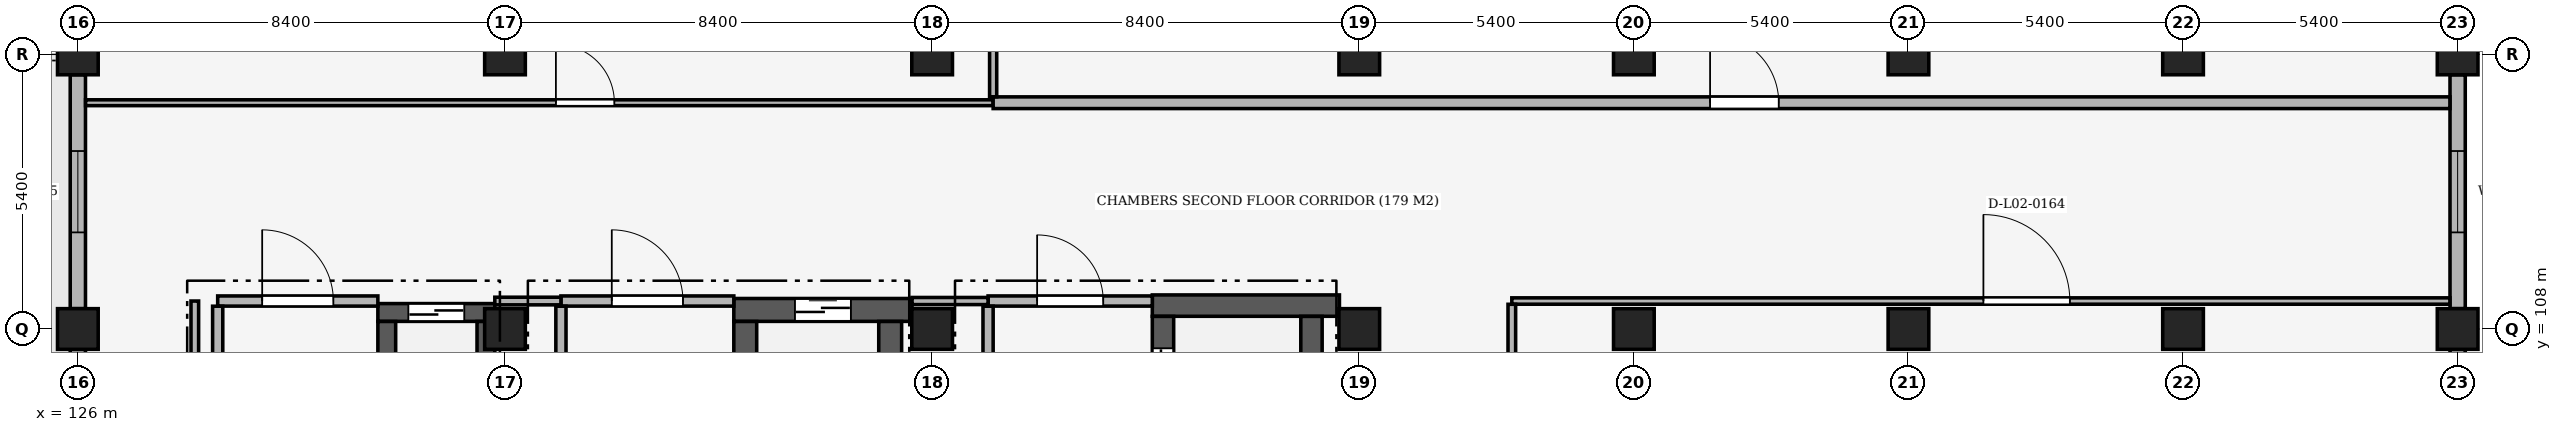
"""IFC4 building model, lengths in metres.
Left out: names, types, materials, properties, quantities, classifications, styles, units other than length and angle.
Written with IfcOpenShell. Run it as: python <this file> out.ifc"""

import sys

from ifc_helpers import new_model, si_unit, direction, frame, frame_2d, origin, origin_2d, place, context, subcontext, project, spatial, rectangle, extrude, element, fill, save


model = new_model("IFC4")
c1 = context("Model", 3, precision=1e-05, world=origin(), true_north=direction((0.0, 1.0)))
c2 = subcontext(c1, "Body", "Model", "MODEL_VIEW")
j1 = project(units=[si_unit("LENGTHUNIT", "METRE"), si_unit("PLANEANGLEUNIT", "RADIAN")], contexts=[c1])
p1 = place(None, origin())
s1 = spatial("IfcSite", under=j1, at=p1, CompositionType="ELEMENT")
p2 = place(p1, origin())
s2 = spatial("IfcBuilding", under=s1, at=p2, CompositionType="ELEMENT")
p3 = place(p2, frame((0.0, 0.0, 10.2)))
s3 = spatial("IfcBuildingStorey", under=s2, at=p3, CompositionType="ELEMENT", Elevation=10.2)
for number, where, z_axis, x_axis in (
    (1, (126.0, 108.0, 0.0), (0.0, 0.0, 1.0), (1.0, 0.0, 0.0)),
    (2, (126.0, 113.4, 0.0), (0.0, 0.0, 1.0), (1.0, 0.0, 0.0)),
    (3, (134.4, 108.0, 0.0), (0.0, 0.0, 1.0), (1.0, 0.0, 0.0)),
    (4, (134.4, 113.4, 0.0), (0.0, 0.0, 1.0), (1.0, 0.0, 0.0)),
    (5, (142.8, 108.0, 0.0), (0.0, 0.0, 1.0), (1.0, 0.0, 0.0)),
    (6, (142.8, 113.4, 0.0), (0.0, 0.0, 1.0), (1.0, 0.0, 0.0)),
    (7, (151.2, 108.0, 0.0), (0.0, 0.0, 1.0), (1.0, 0.0, 0.0)),
    (8, (151.2, 113.4, 0.0), (0.0, 0.0, 1.0), (1.0, 0.0, 0.0)),
    (9, (156.6, 108.0, 0.0), (0.0, 0.0, 1.0), (1.0, 0.0, 0.0)),
    (10, (156.6, 113.4, 0.0), (0.0, 0.0, 1.0), (1.0, 0.0, 0.0)),
    (11, (162.0, 108.0, 0.0), (0.0, 0.0, 1.0), (1.0, 0.0, 0.0)),
    (12, (162.0, 113.4, 0.0), (0.0, 0.0, 1.0), (1.0, 0.0, 0.0)),
    (13, (167.4, 108.0, 0.0), (0.0, 0.0, 1.0), (1.0, 0.0, 0.0)),
    (14, (167.4, 113.4, 0.0), (0.0, 0.0, 1.0), (1.0, 0.0, 0.0)),
    (15, (172.8, 108.0, 0.0), (0.0, 0.0, 1.0), (1.0, 0.0, 0.0)),
    (16, (172.8, 113.4, 0.0), (0.0, 0.0, 1.0), (1.0, 0.0, 0.0)),
):
    element("IfcColumn", number, at=place(p3, frame(where, z_axis=z_axis, x_axis=x_axis)), inside=s3, PredefinedType="COLUMN", context=c2, shape_type="SweptSolid", body=[
        extrude(rectangle(XDim=0.8, YDim=0.8, at=origin_2d()), origin(), (0.0, 0.0, 1.0), 5.1),
    ])
p4 = place(p3, frame((172.8, 113.0, 0.0), z_axis=(0.0, 0.0, 1.0), x_axis=(0.0, -1.0, 0.0)))
e17 = element("IfcWall", 17, at=p4, inside=s3, PredefinedType="SOLIDWALL", context=c2, shape_type="SweptSolid", body=[
    extrude(rectangle(XDim=4.6, YDim=0.3, at=frame_2d((2.3, 0.0))), origin(), (0.0, 0.0, 1.0), 4.27),
])
p5 = place(p4, frame((1.5, 0.0, 1.05)))
e18 = element("IfcOpeningElement", 18, at=p5, cuts=e17, PredefinedType="OPENING", context=c2, shape_type="SweptSolid", body=[
    extrude(rectangle(XDim=1.6, YDim=1.8, at=frame_2d((0.8, 0.9))), frame((0.0, 0.165, 0.0), z_axis=(0.0, -1.0, 0.0), x_axis=(1.0, 0.0, 0.0)), (0.0, 0.0, 1.0), 0.33),
])
p6 = place(p3, frame((172.8, 107.6, 0.0), z_axis=(0.0, 0.0, 1.0), x_axis=(0.0, -1.0, 0.0)))
e19 = element("IfcWall", 19, at=p6, inside=s3, PredefinedType="SOLIDWALL", context=c2, shape_type="SweptSolid", body=[
    extrude(rectangle(XDim=7.6, YDim=0.3, at=frame_2d((3.8, 0.0))), origin(), (0.0, 0.0, 1.0), 4.12),
])
p7 = place(p6, frame((1.467, 0.0, 1.05)))
e20 = element("IfcOpeningElement", 20, at=p7, cuts=e19, PredefinedType="OPENING", context=c2, shape_type="SweptSolid", body=[
    extrude(rectangle(XDim=1.6, YDim=1.8, at=frame_2d((0.8, 0.9))), frame((0.0, 0.165, 0.0), z_axis=(0.0, -1.0, 0.0), x_axis=(1.0, 0.0, 0.0)), (0.0, 0.0, 1.0), 0.33),
])
p8 = place(p6, frame((4.533, 0.0, 1.05)))
e21 = element("IfcOpeningElement", 21, at=p8, cuts=e19, PredefinedType="OPENING", context=c2, shape_type="SweptSolid", body=[
    extrude(rectangle(XDim=1.6, YDim=1.8, at=frame_2d((0.8, 0.9))), frame((0.0, 0.165, 0.0), z_axis=(0.0, -1.0, 0.0), x_axis=(1.0, 0.0, 0.0)), (0.0, 0.0, 1.0), 0.33),
])
p9 = place(p3, frame((126.0, 100.0, 0.0), z_axis=(0.0, 0.0, 1.0), x_axis=(0.0, 1.0, 0.0)))
e22 = element("IfcWall", 22, at=p9, inside=s3, PredefinedType="SOLIDWALL", context=c2, shape_type="SweptSolid", body=[
    extrude(rectangle(XDim=7.6, YDim=0.3, at=frame_2d((3.8, 0.0))), origin(), (0.0, 0.0, 1.0), 4.12),
])
p10 = place(p9, frame((2.9, 0.0, 0.0)))
e23 = element("IfcOpeningElement", 23, at=p10, cuts=e22, PredefinedType="OPENING", context=c2, shape_type="SweptSolid", body=[
    extrude(rectangle(XDim=1.8, YDim=2.2, at=frame_2d((0.9, 1.1))), frame((0.0, 0.165, 0.0), z_axis=(0.0, -1.0, 0.0), x_axis=(1.0, 0.0, 0.0)), (0.0, 0.0, 1.0), 0.33),
])
p11 = place(p3, frame((126.0, 108.4, 0.0), z_axis=(0.0, 0.0, 1.0), x_axis=(0.0, 1.0, 0.0)))
e24 = element("IfcWall", 24, at=p11, inside=s3, PredefinedType="SOLIDWALL", context=c2, shape_type="SweptSolid", body=[
    extrude(rectangle(XDim=4.6, YDim=0.3, at=frame_2d((2.3, 0.0))), origin(), (0.0, 0.0, 1.0), 4.27),
])
p12 = place(p11, frame((1.5, 0.0, 1.05)))
e25 = element("IfcOpeningElement", 25, at=p12, cuts=e24, PredefinedType="OPENING", context=c2, shape_type="SweptSolid", body=[
    extrude(rectangle(XDim=1.6, YDim=1.8, at=frame_2d((0.8, 0.9))), frame((0.0, 0.165, 0.0), z_axis=(0.0, -1.0, 0.0), x_axis=(1.0, 0.0, 0.0)), (0.0, 0.0, 1.0), 0.33),
])
p13 = place(p3, frame((131.9, 108.325, 0.0), z_axis=(0.0, 0.0, 1.0), x_axis=(1.0, 0.0, 0.0)))
e26 = element("IfcWall", 26, at=p13, inside=s3, PredefinedType="SHEAR", context=c2, shape_type="SweptSolid", body=[
    extrude(rectangle(XDim=2.3, YDim=0.35, at=frame_2d((1.15, 0.0))), origin(), (0.0, 0.0, 1.0), 4.82),
])
p14 = place(p13, frame((0.6, 0.0, 0.0)))
e27 = element("IfcOpeningElement", 27, at=p14, cuts=e26, PredefinedType="OPENING", context=c2, shape_type="SweptSolid", body=[
    extrude(rectangle(XDim=1.1, YDim=2.15, at=frame_2d((0.55, 1.075))), frame((0.0, 0.19, 0.0), z_axis=(0.0, -1.0, 0.0), x_axis=(1.0, 0.0, 0.0)), (0.0, 0.0, 1.0), 0.38),
])
for number, where, z_axis, x_axis in (
    (28, (132.075, 106.093, 0.0), (0.0, 0.0, 1.0), (0.0, 1.0, 0.0)),
    (29, (134.025, 106.093, 0.0), (0.0, 0.0, 1.0), (0.0, 1.0, 0.0)),
):
    element("IfcWall", number, at=place(p3, frame(where, z_axis=z_axis, x_axis=x_axis)), inside=s3, PredefinedType="SHEAR", context=c2, shape_type="SweptSolid", body=[
        extrude(rectangle(XDim=2.055, YDim=0.35, at=frame_2d((1.027, 0.0))), origin(), (0.0, 0.0, 1.0), 4.82),
    ])
p15 = place(p3, frame((138.9, 108.375, 0.0), z_axis=(0.0, 0.0, 1.0), x_axis=(1.0, 0.0, 0.0)))
e30 = element("IfcWall", 30, at=p15, inside=s3, PredefinedType="SHEAR", context=c2, shape_type="SweptSolid", body=[
    extrude(rectangle(XDim=3.505, YDim=0.45, at=frame_2d((1.752, 0.0))), origin(), (0.0, 0.0, 1.0), 4.82),
])
p16 = place(p15, frame((1.202, 0.0, 0.0)))
e31 = element("IfcOpeningElement", 31, at=p16, cuts=e30, PredefinedType="OPENING", context=c2, shape_type="SweptSolid", body=[
    extrude(rectangle(XDim=1.1, YDim=2.15, at=frame_2d((0.55, 1.075))), frame((0.0, 0.24, 0.0), z_axis=(0.0, -1.0, 0.0), x_axis=(1.0, 0.0, 0.0)), (0.0, 0.0, 1.0), 0.48),
])
for number, where, z_axis, x_axis in (
    (32, (139.125, 106.093, 0.0), (0.0, 0.0, 1.0), (0.0, 1.0, 0.0)),
    (33, (141.975, 106.093, 0.0), (0.0, 0.0, 1.0), (0.0, 1.0, 0.0)),
):
    element("IfcWall", number, at=place(p3, frame(where, z_axis=z_axis, x_axis=x_axis)), inside=s3, PredefinedType="SHEAR", context=c2, shape_type="SweptSolid", body=[
        extrude(rectangle(XDim=2.055, YDim=0.45, at=frame_2d((1.027, 0.0))), origin(), (0.0, 0.0, 1.0), 4.82),
    ])
p17 = place(p3, frame((147.13, 108.46, 0.0), z_axis=(0.0, 0.0, 1.0), x_axis=(1.0, 0.0, 0.0)))
e34 = element("IfcWall", 34, at=p17, inside=s3, PredefinedType="SHEAR", context=c2, shape_type="SweptSolid", body=[
    extrude(rectangle(XDim=3.68, YDim=0.42, at=frame_2d((1.84, 0.0))), origin(), (0.0, 0.0, 1.0), 4.82),
])
p18 = place(p3, frame((147.34, 105.793, 0.0), z_axis=(0.0, 0.0, 1.0), x_axis=(0.0, 1.0, 0.0)))
e35 = element("IfcWall", 35, at=p18, inside=s3, PredefinedType="SHEAR", context=c2, shape_type="SweptSolid", body=[
    extrude(rectangle(XDim=2.455, YDim=0.42, at=frame_2d((1.228, 0.0))), origin(), (0.0, 0.0, 1.0), 4.82),
])
p19 = place(p18, frame((0.627, 0.0, 0.0)))
e36 = element("IfcOpeningElement", 36, at=p19, cuts=e35, PredefinedType="OPENING", context=c2, shape_type="SweptSolid", body=[
    extrude(rectangle(XDim=1.2, YDim=2.15, at=frame_2d((0.6, 1.075))), frame((0.0, 0.225, 0.0), z_axis=(0.0, -1.0, 0.0), x_axis=(1.0, 0.0, 0.0)), (0.0, 0.0, 1.0), 0.45),
])
p20 = place(p3, frame((150.26, 105.793, 0.0), z_axis=(0.0, 0.0, 1.0), x_axis=(0.0, 1.0, 0.0)))
e37 = element("IfcWall", 37, at=p20, inside=s3, PredefinedType="SHEAR", context=c2, shape_type="SweptSolid", body=[
    extrude(rectangle(XDim=2.455, YDim=0.42, at=frame_2d((1.228, 0.0))), origin(), (0.0, 0.0, 1.0), 4.82),
])
p21 = place(p3, frame((128.75, 108.55, 0.0), z_axis=(0.0, 0.0, 1.0), x_axis=(1.0, 0.0, 0.0)))
e38 = element("IfcWall", 38, at=p21, inside=s3, PredefinedType="PARTITIONING", context=c2, shape_type="SweptSolid", body=[
    extrude(rectangle(XDim=3.15, YDim=0.2, at=frame_2d((1.575, 0.0))), origin(), (0.0, 0.0, 1.0), 4.82),
])
p22 = place(p21, frame((0.875, 0.0, 0.0)))
e39 = element("IfcOpeningElement", 39, at=p22, cuts=e38, PredefinedType="OPENING", context=c2, shape_type="SweptSolid", body=[
    extrude(rectangle(XDim=1.4, YDim=2.2, at=frame_2d((0.7, 1.1))), frame((0.0, 0.115, 0.0), z_axis=(0.0, -1.0, 0.0), x_axis=(1.0, 0.0, 0.0)), (0.0, 0.0, 1.0), 0.23),
])
p23 = place(p3, frame((135.5, 108.55, 0.0), z_axis=(0.0, 0.0, 1.0), x_axis=(1.0, 0.0, 0.0)))
e40 = element("IfcWall", 40, at=p23, inside=s3, PredefinedType="PARTITIONING", context=c2, shape_type="SweptSolid", body=[
    extrude(rectangle(XDim=3.4, YDim=0.2, at=frame_2d((1.7, 0.0))), origin(), (0.0, 0.0, 1.0), 4.82),
])
p24 = place(p23, frame((1.0, 0.0, 0.0)))
e41 = element("IfcOpeningElement", 41, at=p24, cuts=e40, PredefinedType="OPENING", context=c2, shape_type="SweptSolid", body=[
    extrude(rectangle(XDim=1.4, YDim=2.2, at=frame_2d((0.7, 1.1))), frame((0.0, 0.115, 0.0), z_axis=(0.0, -1.0, 0.0), x_axis=(1.0, 0.0, 0.0)), (0.0, 0.0, 1.0), 0.23),
])
p25 = place(p3, frame((143.9, 108.55, 0.0), z_axis=(0.0, 0.0, 1.0), x_axis=(1.0, 0.0, 0.0)))
e42 = element("IfcWall", 42, at=p25, inside=s3, PredefinedType="PARTITIONING", context=c2, shape_type="SweptSolid", body=[
    extrude(rectangle(XDim=3.23, YDim=0.2, at=frame_2d((1.615, 0.0))), origin(), (0.0, 0.0, 1.0), 4.82),
])
p26 = place(p25, frame((0.965, 0.0, 0.0)))
e43 = element("IfcOpeningElement", 43, at=p26, cuts=e42, PredefinedType="OPENING", context=c2, shape_type="SweptSolid", body=[
    extrude(rectangle(XDim=1.3, YDim=2.2, at=frame_2d((0.65, 1.1))), frame((0.0, 0.115, 0.0), z_axis=(0.0, -1.0, 0.0), x_axis=(1.0, 0.0, 0.0)), (0.0, 0.0, 1.0), 0.23),
])
p27 = place(p3, frame((134.2, 108.55, 0.0), z_axis=(0.0, 0.0, 1.0), x_axis=(1.0, 0.0, 0.0)))
e44 = element("IfcWall", 44, at=p27, inside=s3, PredefinedType="PARTITIONING", context=c2, shape_type="SweptSolid", body=[
    extrude(rectangle(XDim=1.3, YDim=0.15, at=frame_2d((0.65, 0.0))), origin(), (0.0, 0.0, 1.0), 4.27),
])
p28 = place(p3, frame((142.405, 108.55, 0.0), z_axis=(0.0, 0.0, 1.0), x_axis=(1.0, 0.0, 0.0)))
e45 = element("IfcWall", 45, at=p28, inside=s3, PredefinedType="PARTITIONING", context=c2, shape_type="SweptSolid", body=[
    extrude(rectangle(XDim=1.495, YDim=0.14, at=frame_2d((0.748, 0.0))), origin(), (0.0, 0.0, 1.0), 4.27),
])
p29 = place(p3, frame((154.2, 108.55, 0.0), z_axis=(0.0, 0.0, 1.0), x_axis=(1.0, 0.0, 0.0)))
e46 = element("IfcWall", 46, at=p29, inside=s3, PredefinedType="PARTITIONING", context=c2, shape_type="SweptSolid", body=[
    extrude(rectangle(XDim=18.448, YDim=0.125, at=frame_2d((9.224, 0.0))), origin(), (0.0, 0.0, 1.0), 4.27),
])
p30 = place(p29, frame((9.274, 0.0, 0.0)))
e47 = element("IfcOpeningElement", 47, at=p30, cuts=e46, PredefinedType="OPENING", context=c2, shape_type="SweptSolid", body=[
    extrude(rectangle(XDim=1.7, YDim=2.35, at=frame_2d((0.85, 1.175))), frame((0.0, 0.077, 0.0), z_axis=(0.0, -1.0, 0.0), x_axis=(1.0, 0.0, 0.0)), (0.0, 0.0, 1.0), 0.155),
])
p31 = place(p3, frame((126.152, 112.45, 0.0), z_axis=(0.0, 0.0, 1.0), x_axis=(1.0, 0.0, 0.0)))
e48 = element("IfcWall", 48, at=p31, inside=s3, PredefinedType="PARTITIONING", context=c2, shape_type="SweptSolid", body=[
    extrude(rectangle(XDim=17.848, YDim=0.115, at=frame_2d((8.924, 0.0))), origin(), (0.0, 0.0, 1.0), 4.27),
])
p32 = place(p31, frame((9.249, 0.0, 0.0)))
e49 = element("IfcOpeningElement", 49, at=p32, cuts=e48, PredefinedType="OPENING", context=c2, shape_type="SweptSolid", body=[
    extrude(rectangle(XDim=1.15, YDim=2.15, at=frame_2d((0.575, 1.075))), frame((0.0, 0.072, 0.0), z_axis=(0.0, -1.0, 0.0), x_axis=(1.0, 0.0, 0.0)), (0.0, 0.0, 1.0), 0.145),
])
p33 = place(p3, frame((144.0, 112.45, 0.0), z_axis=(0.0, 0.0, 1.0), x_axis=(1.0, 0.0, 0.0)))
e50 = element("IfcWall", 50, at=p33, inside=s3, PredefinedType="SOLIDWALL", context=c2, shape_type="SweptSolid", body=[
    extrude(rectangle(XDim=28.648, YDim=0.23, at=frame_2d((14.324, 0.0))), origin(), (0.0, 0.0, 1.0), 4.27),
])
p34 = place(p33, frame((14.099, 0.0, 0.0)))
e51 = element("IfcOpeningElement", 51, at=p34, cuts=e50, PredefinedType="OPENING", context=c2, shape_type="SweptSolid", body=[
    extrude(rectangle(XDim=1.35, YDim=2.2, at=frame_2d((0.675, 1.1))), frame((0.0, 0.13, 0.0), z_axis=(0.0, -1.0, 0.0), x_axis=(1.0, 0.0, 0.0)), (0.0, 0.0, 1.0), 0.26),
])
p35 = place(p3, frame((128.3, 103.248, 0.0), z_axis=(0.0, 0.0, 1.0), x_axis=(0.0, 1.0, 0.0)))
e52 = element("IfcWall", 52, at=p35, inside=s3, PredefinedType="PARTITIONING", context=c2, shape_type="SweptSolid", body=[
    extrude(rectangle(XDim=5.302, YDim=0.15, at=frame_2d((2.651, 0.0))), origin(), (0.0, 0.0, 1.0), 4.82),
])
p36 = place(p3, frame((128.75, 103.602, 0.0), z_axis=(0.0, 0.0, 1.0), x_axis=(0.0, 1.0, 0.0)))
e53 = element("IfcWall", 53, at=p36, inside=s3, PredefinedType="PARTITIONING", context=c2, shape_type="SweptSolid", body=[
    extrude(rectangle(XDim=4.846, YDim=0.2, at=frame_2d((2.423, 0.0))), origin(), (0.0, 0.0, 1.0), 4.82),
])
p37 = place(p3, frame((135.5, 103.702, 0.0), z_axis=(0.0, 0.0, 1.0), x_axis=(0.0, 1.0, 0.0)))
e54 = element("IfcWall", 54, at=p37, inside=s3, PredefinedType="PARTITIONING", context=c2, shape_type="SweptSolid", body=[
    extrude(rectangle(XDim=4.746, YDim=0.2, at=frame_2d((2.373, 0.0))), origin(), (0.0, 0.0, 1.0), 4.82),
])
p38 = place(p3, frame((143.9, 103.672, 0.0), z_axis=(0.0, 0.0, 1.0), x_axis=(0.0, 1.0, 0.0)))
e55 = element("IfcWall", 55, at=p38, inside=s3, PredefinedType="PARTITIONING", context=c2, shape_type="SweptSolid", body=[
    extrude(rectangle(XDim=4.776, YDim=0.2, at=frame_2d((2.388, 0.0))), origin(), (0.0, 0.0, 1.0), 4.82),
])
p39 = place(p3, frame((144.0, 112.567, 0.0), z_axis=(0.0, 0.0, 1.0), x_axis=(0.0, 1.0, 0.0)))
e56 = element("IfcWall", 56, at=p39, inside=s3, PredefinedType="PARTITIONING", context=c2, shape_type="SweptSolid", body=[
    extrude(rectangle(XDim=6.081, YDim=0.14, at=frame_2d((3.041, 0.0))), origin(), (0.0, 0.0, 1.0), 4.12),
])
p40 = place(p3, frame((154.2, 93.752, 0.0), z_axis=(0.0, 0.0, 1.0), x_axis=(0.0, 1.0, 0.0)))
e57 = element("IfcWall", 57, at=p40, inside=s3, PredefinedType="PARTITIONING", context=c2, shape_type="SweptSolid", body=[
    extrude(rectangle(XDim=14.734, YDim=0.15, at=frame_2d((7.367, 0.0))), origin(), (0.0, 0.0, 1.0), 4.22),
])
p41 = place(p5, origin())
e58 = element("IfcWindow", 58, at=p41, inside=s3, PartitioningType="SINGLE_PANEL", PredefinedType="WINDOW", context=c2, shape_type="SweptSolid", body=[
    extrude(rectangle(XDim=1.6, YDim=1.8, at=frame_2d((0.8, 0.9))), frame((0.0, 0.03, 0.0), z_axis=(0.0, -1.0, 0.0), x_axis=(1.0, 0.0, 0.0)), (0.0, 0.0, 1.0), 0.06),
])
fill(e18, e58)
p42 = place(p12, origin())
e59 = element("IfcWindow", 59, at=p42, inside=s3, PartitioningType="SINGLE_PANEL", PredefinedType="WINDOW", context=c2, shape_type="SweptSolid", body=[
    extrude(rectangle(XDim=1.6, YDim=1.8, at=frame_2d((0.8, 0.9))), frame((0.0, 0.03, 0.0), z_axis=(0.0, -1.0, 0.0), x_axis=(1.0, 0.0, 0.0)), (0.0, 0.0, 1.0), 0.06),
])
fill(e25, e59)
p43 = place(p14, origin())
e60 = element("IfcDoor", 60, at=p43, inside=s3, OperationType="DOUBLE_DOOR_SLIDING", PredefinedType="DOOR", context=c2, shape_type="SweptSolid", body=[
    extrude(rectangle(XDim=1.1, YDim=2.15, at=frame_2d((0.55, 1.075))), frame((0.0, 0.025, 0.0), z_axis=(0.0, -1.0, 0.0), x_axis=(1.0, 0.0, 0.0)), (0.0, 0.0, 1.0), 0.05),
])
fill(e27, e60)
p44 = place(p16, origin())
e61 = element("IfcDoor", 61, at=p44, inside=s3, OperationType="DOUBLE_DOOR_SLIDING", PredefinedType="DOOR", context=c2, shape_type="SweptSolid", body=[
    extrude(rectangle(XDim=1.1, YDim=2.15, at=frame_2d((0.55, 1.075))), frame((0.0, 0.025, 0.0), z_axis=(0.0, -1.0, 0.0), x_axis=(1.0, 0.0, 0.0)), (0.0, 0.0, 1.0), 0.05),
])
fill(e31, e61)
p45 = place(p19, origin())
e62 = element("IfcDoor", 62, at=p45, inside=s3, OperationType="DOUBLE_DOOR_SLIDING", PredefinedType="DOOR", context=c2, shape_type="SweptSolid", body=[
    extrude(rectangle(XDim=1.2, YDim=2.15, at=frame_2d((0.6, 1.075))), frame((0.0, 0.025, 0.0), z_axis=(0.0, -1.0, 0.0), x_axis=(1.0, 0.0, 0.0)), (0.0, 0.0, 1.0), 0.05),
])
fill(e36, e62)
p46 = place(p22, origin())
e63 = element("IfcDoor", 63, at=p46, inside=s3, OperationType="SINGLE_SWING_LEFT", PredefinedType="DOOR", context=c2, shape_type="SweptSolid", body=[
    extrude(rectangle(XDim=1.4, YDim=2.2, at=frame_2d((0.7, 1.1))), frame((0.0, 0.025, 0.0), z_axis=(0.0, -1.0, 0.0), x_axis=(1.0, 0.0, 0.0)), (0.0, 0.0, 1.0), 0.05),
])
fill(e39, e63)
p47 = place(p24, origin())
e64 = element("IfcDoor", 64, at=p47, inside=s3, OperationType="SINGLE_SWING_LEFT", PredefinedType="DOOR", context=c2, shape_type="SweptSolid", body=[
    extrude(rectangle(XDim=1.4, YDim=2.2, at=frame_2d((0.7, 1.1))), frame((0.0, 0.025, 0.0), z_axis=(0.0, -1.0, 0.0), x_axis=(1.0, 0.0, 0.0)), (0.0, 0.0, 1.0), 0.05),
])
fill(e41, e64)
p48 = place(p26, origin())
e65 = element("IfcDoor", 65, at=p48, inside=s3, OperationType="SINGLE_SWING_LEFT", PredefinedType="DOOR", context=c2, shape_type="SweptSolid", body=[
    extrude(rectangle(XDim=1.3, YDim=2.2, at=frame_2d((0.65, 1.1))), frame((0.0, 0.025, 0.0), z_axis=(0.0, -1.0, 0.0), x_axis=(1.0, 0.0, 0.0)), (0.0, 0.0, 1.0), 0.05),
])
fill(e43, e65)
p49 = place(p32, origin())
e66 = element("IfcDoor", 66, at=p49, inside=s3, OperationType="SINGLE_SWING_LEFT", PredefinedType="DOOR", context=c2, shape_type="SweptSolid", body=[
    extrude(rectangle(XDim=1.15, YDim=2.15, at=frame_2d((0.575, 1.075))), frame((0.0, 0.025, 0.0), z_axis=(0.0, -1.0, 0.0), x_axis=(1.0, 0.0, 0.0)), (0.0, 0.0, 1.0), 0.05),
])
fill(e49, e66)
p50 = place(p34, origin())
e67 = element("IfcDoor", 67, at=p50, inside=s3, OperationType="SINGLE_SWING_LEFT", PredefinedType="DOOR", context=c2, shape_type="SweptSolid", body=[
    extrude(rectangle(XDim=1.35, YDim=2.2, at=frame_2d((0.675, 1.1))), frame((0.0, 0.025, 0.0), z_axis=(0.0, -1.0, 0.0), x_axis=(1.0, 0.0, 0.0)), (0.0, 0.0, 1.0), 0.05),
])
fill(e51, e67)
p51 = place(p30, origin())
e68 = element("IfcDoor", 68, at=p51, inside=s3, OperationType="SINGLE_SWING_LEFT", PredefinedType="DOOR", context=c2, shape_type="SweptSolid", body=[
    extrude(rectangle(XDim=1.7, YDim=2.35, at=frame_2d((0.85, 1.175))), frame((0.0, 0.025, 0.0), z_axis=(0.0, -1.0, 0.0), x_axis=(1.0, 0.0, 0.0)), (0.0, 0.0, 1.0), 0.05),
])
fill(e47, e68)
save(model, sys.argv[1])
